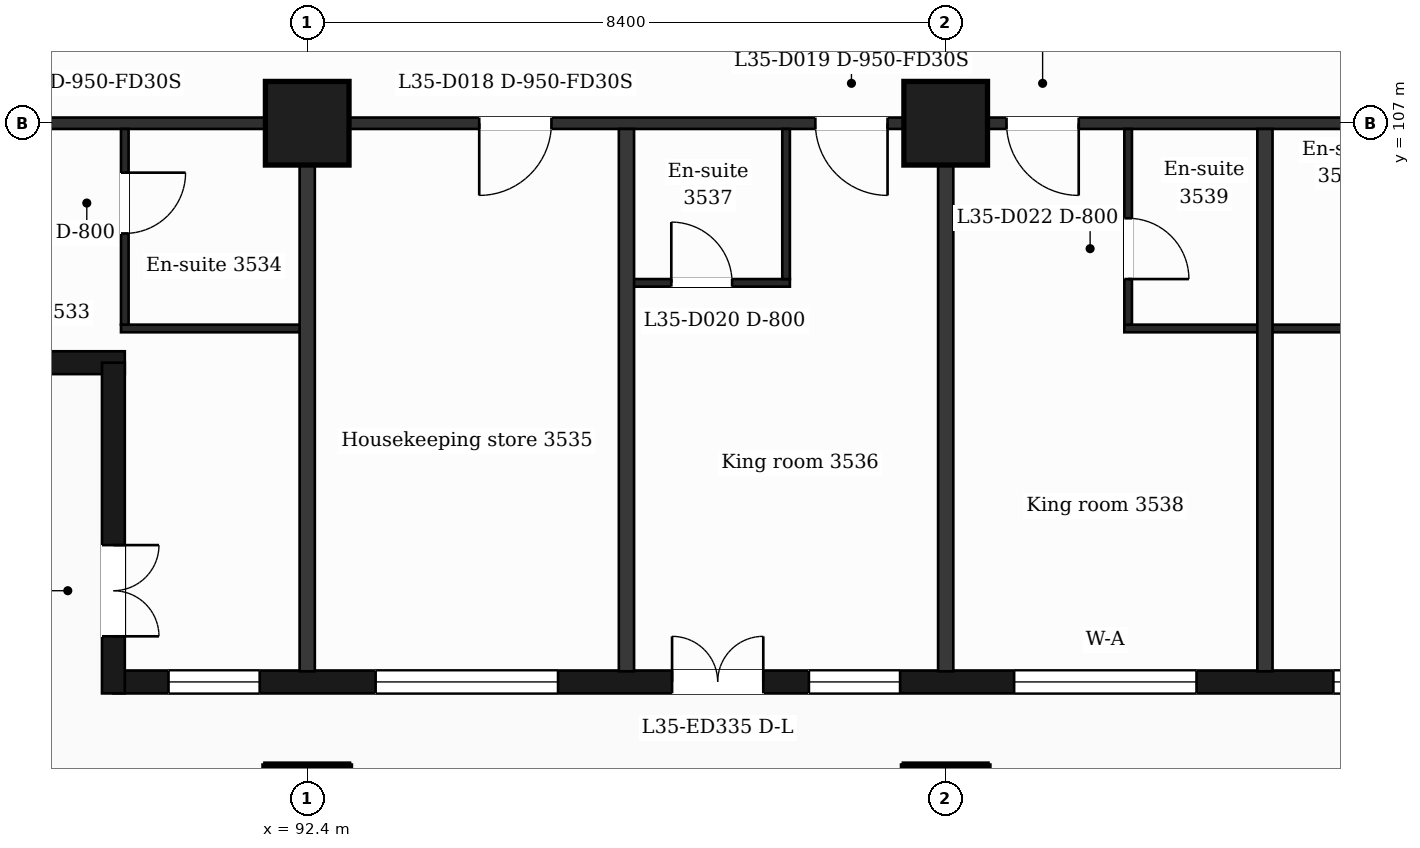
"""IFC4 building model, lengths in metres.
Left out: names, types, materials, properties, quantities, classifications, styles, units other than length and angle.
Written with IfcOpenShell. Run it as: python <this file> out.ifc"""

import sys

from ifc_helpers import new_model, si_unit, direction, frame, frame_2d, origin, origin_2d, place, context, subcontext, project, spatial, rectangle, extrude, element, fill, save


model = new_model("IFC4")
c1 = context("Model", 3, precision=1e-05, world=origin(), true_north=direction((0.0, 1.0)))
c2 = subcontext(c1, "Body", "Model", "MODEL_VIEW")
j1 = project(units=[si_unit("LENGTHUNIT", "METRE"), si_unit("PLANEANGLEUNIT", "RADIAN")], contexts=[c1])
p1 = place(None, origin())
s1 = spatial("IfcSite", under=j1, at=p1, CompositionType="ELEMENT")
p2 = place(p1, origin())
s2 = spatial("IfcBuilding", under=s1, at=p2, CompositionType="ELEMENT")
p3 = place(p2, frame((0.0, 0.0, 151.5)))
s3 = spatial("IfcBuildingStorey", under=s2, at=p3, CompositionType="ELEMENT", Elevation=151.5)
for number, where, z_axis, x_axis in (
    (1, (92.4, 98.0, 0.0), (0.0, 0.0, 1.0), (1.0, 0.0, 0.0)),
    (2, (100.8, 98.0, 0.0), (0.0, 0.0, 1.0), (1.0, 0.0, 0.0)),
    (3, (92.4, 107.0, 0.0), (0.0, 0.0, 1.0), (1.0, 0.0, 0.0)),
    (4, (100.8, 107.0, 0.0), (0.0, 0.0, 1.0), (1.0, 0.0, 0.0)),
):
    element("IfcColumn", number, at=place(p3, frame(where, z_axis=z_axis, x_axis=x_axis)), inside=s3, PredefinedType="COLUMN", context=c2, shape_type="SweptSolid", body=[
        extrude(rectangle(XDim=1.1, YDim=1.1, at=origin_2d()), origin(), (0.0, 0.0, 1.0), 3.7),
    ])
p4 = place(p3, frame((89.85, 99.65, 0.0), z_axis=(0.0, 0.0, 1.0), x_axis=(1.0, 0.0, 0.0)))
e5 = element("IfcWall", 5, at=p4, inside=s3, PredefinedType="SOLIDWALL", context=c2, shape_type="SweptSolid", body=[
    extrude(rectangle(XDim=47.25, YDim=0.3, at=frame_2d((23.625, 0.0))), origin(), (0.0, 0.0, 1.0), 3.38),
])
p5 = place(p4, frame((0.725, 0.0, 0.9)))
e6 = element("IfcOpeningElement", 6, at=p5, cuts=e5, PredefinedType="OPENING", context=c2, shape_type="SweptSolid", body=[
    extrude(rectangle(XDim=1.2, YDim=2.1, at=frame_2d((0.6, 1.05))), frame((0.0, 0.16, 0.0), z_axis=(0.0, -1.0, 0.0), x_axis=(1.0, 0.0, 0.0)), (0.0, 0.0, 1.0), 0.32),
])
p6 = place(p4, frame((3.45, 0.0, 0.9)))
e7 = element("IfcOpeningElement", 7, at=p6, cuts=e5, PredefinedType="OPENING", context=c2, shape_type="SweptSolid", body=[
    extrude(rectangle(XDim=2.4, YDim=2.1, at=frame_2d((1.2, 1.05))), frame((0.0, 0.16, 0.0), z_axis=(0.0, -1.0, 0.0), x_axis=(1.0, 0.0, 0.0)), (0.0, 0.0, 1.0), 0.32),
])
p7 = place(p4, frame((7.35, 0.0, 0.0)))
e8 = element("IfcOpeningElement", 8, at=p7, cuts=e5, PredefinedType="OPENING", context=c2, shape_type="SweptSolid", body=[
    extrude(rectangle(XDim=1.2, YDim=2.4, at=frame_2d((0.6, 1.2))), frame((0.0, 0.16, 0.0), z_axis=(0.0, -1.0, 0.0), x_axis=(1.0, 0.0, 0.0)), (0.0, 0.0, 1.0), 0.32),
])
p8 = place(p4, frame((9.15, 0.0, 0.9)))
e9 = element("IfcOpeningElement", 9, at=p8, cuts=e5, PredefinedType="OPENING", context=c2, shape_type="SweptSolid", body=[
    extrude(rectangle(XDim=1.2, YDim=2.1, at=frame_2d((0.6, 1.05))), frame((0.0, 0.16, 0.0), z_axis=(0.0, -1.0, 0.0), x_axis=(1.0, 0.0, 0.0)), (0.0, 0.0, 1.0), 0.32),
])
p9 = place(p4, frame((11.85, 0.0, 0.9)))
e10 = element("IfcOpeningElement", 10, at=p9, cuts=e5, PredefinedType="OPENING", context=c2, shape_type="SweptSolid", body=[
    extrude(rectangle(XDim=2.4, YDim=2.1, at=frame_2d((1.2, 1.05))), frame((0.0, 0.16, 0.0), z_axis=(0.0, -1.0, 0.0), x_axis=(1.0, 0.0, 0.0)), (0.0, 0.0, 1.0), 0.32),
])
p10 = place(p4, frame((16.05, 0.0, 0.9)))
e11 = element("IfcOpeningElement", 11, at=p10, cuts=e5, PredefinedType="OPENING", context=c2, shape_type="SweptSolid", body=[
    extrude(rectangle(XDim=2.4, YDim=2.1, at=frame_2d((1.2, 1.05))), frame((0.0, 0.16, 0.0), z_axis=(0.0, -1.0, 0.0), x_axis=(1.0, 0.0, 0.0)), (0.0, 0.0, 1.0), 0.32),
])
p11 = place(p4, frame((20.85, 0.0, 0.9)))
e12 = element("IfcOpeningElement", 12, at=p11, cuts=e5, PredefinedType="OPENING", context=c2, shape_type="SweptSolid", body=[
    extrude(rectangle(XDim=1.2, YDim=2.1, at=frame_2d((0.6, 1.05))), frame((0.0, 0.16, 0.0), z_axis=(0.0, -1.0, 0.0), x_axis=(1.0, 0.0, 0.0)), (0.0, 0.0, 1.0), 0.32),
])
p12 = place(p4, frame((25.05, 0.0, 0.9)))
e13 = element("IfcOpeningElement", 13, at=p12, cuts=e5, PredefinedType="OPENING", context=c2, shape_type="SweptSolid", body=[
    extrude(rectangle(XDim=1.2, YDim=2.1, at=frame_2d((0.6, 1.05))), frame((0.0, 0.16, 0.0), z_axis=(0.0, -1.0, 0.0), x_axis=(1.0, 0.0, 0.0)), (0.0, 0.0, 1.0), 0.32),
])
p13 = place(p4, frame((28.65, 0.0, 0.9)))
e14 = element("IfcOpeningElement", 14, at=p13, cuts=e5, PredefinedType="OPENING", context=c2, shape_type="SweptSolid", body=[
    extrude(rectangle(XDim=2.4, YDim=2.1, at=frame_2d((1.2, 1.05))), frame((0.0, 0.16, 0.0), z_axis=(0.0, -1.0, 0.0), x_axis=(1.0, 0.0, 0.0)), (0.0, 0.0, 1.0), 0.32),
])
p14 = place(p4, frame((32.85, 0.0, 0.9)))
e15 = element("IfcOpeningElement", 15, at=p14, cuts=e5, PredefinedType="OPENING", context=c2, shape_type="SweptSolid", body=[
    extrude(rectangle(XDim=2.4, YDim=2.1, at=frame_2d((1.2, 1.05))), frame((0.0, 0.16, 0.0), z_axis=(0.0, -1.0, 0.0), x_axis=(1.0, 0.0, 0.0)), (0.0, 0.0, 1.0), 0.32),
])
p15 = place(p4, frame((37.05, 0.0, 0.9)))
e16 = element("IfcOpeningElement", 16, at=p15, cuts=e5, PredefinedType="OPENING", context=c2, shape_type="SweptSolid", body=[
    extrude(rectangle(XDim=2.4, YDim=2.1, at=frame_2d((1.2, 1.05))), frame((0.0, 0.16, 0.0), z_axis=(0.0, -1.0, 0.0), x_axis=(1.0, 0.0, 0.0)), (0.0, 0.0, 1.0), 0.32),
])
p16 = place(p4, frame((41.25, 0.0, 0.9)))
e17 = element("IfcOpeningElement", 17, at=p16, cuts=e5, PredefinedType="OPENING", context=c2, shape_type="SweptSolid", body=[
    extrude(rectangle(XDim=2.4, YDim=2.1, at=frame_2d((1.2, 1.05))), frame((0.0, 0.16, 0.0), z_axis=(0.0, -1.0, 0.0), x_axis=(1.0, 0.0, 0.0)), (0.0, 0.0, 1.0), 0.32),
])
p17 = place(p4, frame((45.25, 0.0, 0.9)))
e18 = element("IfcOpeningElement", 18, at=p17, cuts=e5, PredefinedType="OPENING", context=c2, shape_type="SweptSolid", body=[
    extrude(rectangle(XDim=1.2, YDim=2.1, at=frame_2d((0.6, 1.05))), frame((0.0, 0.16, 0.0), z_axis=(0.0, -1.0, 0.0), x_axis=(1.0, 0.0, 0.0)), (0.0, 0.0, 1.0), 0.32),
])
p18 = place(p3, frame((86.452, 103.85, 0.0), z_axis=(0.0, 0.0, 1.0), x_axis=(1.0, 0.0, 0.0)))
e19 = element("IfcWall", 19, at=p18, inside=s3, PredefinedType="SOLIDWALL", context=c2, shape_type="SweptSolid", body=[
    extrude(rectangle(XDim=3.548, YDim=0.3, at=frame_2d((1.774, 0.0))), origin(), (0.0, 0.0, 1.0), 3.38),
])
p19 = place(p3, frame((89.85, 103.85, 0.0), z_axis=(0.0, 0.0, 1.0), x_axis=(0.0, -1.0, 0.0)))
e20 = element("IfcWall", 20, at=p19, inside=s3, PredefinedType="SOLIDWALL", context=c2, shape_type="SweptSolid", body=[
    extrude(rectangle(XDim=4.35, YDim=0.3, at=frame_2d((2.175, 0.0))), origin(), (0.0, 0.0, 1.0), 3.38),
])
p20 = place(p19, frame((2.4, 0.0, 0.0)))
e21 = element("IfcOpeningElement", 21, at=p20, cuts=e20, PredefinedType="OPENING", context=c2, shape_type="SweptSolid", body=[
    extrude(rectangle(XDim=1.2, YDim=2.4, at=frame_2d((0.6, 1.2))), frame((0.0, 0.16, 0.0), z_axis=(0.0, -1.0, 0.0), x_axis=(1.0, 0.0, 0.0)), (0.0, 0.0, 1.0), 0.32),
])
p21 = place(p3, frame((89.95, 104.3, 0.0), z_axis=(0.0, 0.0, 1.0), x_axis=(1.0, 0.0, 0.0)))
e22 = element("IfcWall", 22, at=p21, inside=s3, PredefinedType="PARTITIONING", context=c2, shape_type="SweptSolid", body=[
    extrude(rectangle(XDim=2.45, YDim=0.1, at=frame_2d((1.225, 0.0))), origin(), (0.0, 0.0, 1.0), 3.38),
])
p22 = place(p3, frame((103.15, 104.3, 0.0), z_axis=(0.0, 0.0, 1.0), x_axis=(1.0, 0.0, 0.0)))
e23 = element("IfcWall", 23, at=p22, inside=s3, PredefinedType="PARTITIONING", context=c2, shape_type="SweptSolid", body=[
    extrude(rectangle(XDim=3.7, YDim=0.1, at=frame_2d((1.85, 0.0))), origin(), (0.0, 0.0, 1.0), 3.38),
])
p23 = place(p3, frame((96.6, 104.9, 0.0), z_axis=(0.0, 0.0, 1.0), x_axis=(1.0, 0.0, 0.0)))
e24 = element("IfcWall", 24, at=p23, inside=s3, PredefinedType="PARTITIONING", context=c2, shape_type="SweptSolid", body=[
    extrude(rectangle(XDim=2.15, YDim=0.1, at=frame_2d((1.075, 0.0))), origin(), (0.0, 0.0, 1.0), 3.38),
])
p24 = place(p23, frame((0.59, 0.0, 0.0)))
e25 = element("IfcOpeningElement", 25, at=p24, cuts=e24, PredefinedType="OPENING", context=c2, shape_type="SweptSolid", body=[
    extrude(rectangle(XDim=0.8, YDim=2.1, at=frame_2d((0.4, 1.05))), frame((0.0, 0.06, 0.0), z_axis=(0.0, -1.0, 0.0), x_axis=(1.0, 0.0, 0.0)), (0.0, 0.0, 1.0), 0.12),
])
p25 = place(p3, frame((87.018, 107.0, 0.0), z_axis=(0.0, 0.0, 1.0), x_axis=(1.0, 0.0, 0.0)))
e26 = element("IfcWall", 26, at=p25, inside=s3, PredefinedType="PARTITIONING", context=c2, shape_type="SweptSolid", body=[
    extrude(rectangle(XDim=52.765, YDim=0.15, at=frame_2d((26.382, 0.0))), origin(), (0.0, 0.0, 1.0), 3.38),
])
p26 = place(p25, frame((0.707, 0.0, 0.0)))
e27 = element("IfcOpeningElement", 27, at=p26, cuts=e26, PredefinedType="OPENING", context=c2, shape_type="SweptSolid", body=[
    extrude(rectangle(XDim=0.95, YDim=2.1, at=frame_2d((0.475, 1.05))), frame((0.0, 0.085, 0.0), z_axis=(0.0, -1.0, 0.0), x_axis=(1.0, 0.0, 0.0)), (0.0, 0.0, 1.0), 0.17),
])
p27 = place(p25, frame((7.645, 0.0, 0.0)))
e28 = element("IfcOpeningElement", 28, at=p27, cuts=e26, PredefinedType="OPENING", context=c2, shape_type="SweptSolid", body=[
    extrude(rectangle(XDim=0.95, YDim=2.1, at=frame_2d((0.475, 1.05))), frame((0.0, 0.085, 0.0), z_axis=(0.0, -1.0, 0.0), x_axis=(1.0, 0.0, 0.0)), (0.0, 0.0, 1.0), 0.17),
])
p28 = place(p25, frame((12.067, 0.0, 0.0)))
e29 = element("IfcOpeningElement", 29, at=p28, cuts=e26, PredefinedType="OPENING", context=c2, shape_type="SweptSolid", body=[
    extrude(rectangle(XDim=0.95, YDim=2.1, at=frame_2d((0.475, 1.05))), frame((0.0, 0.085, 0.0), z_axis=(0.0, -1.0, 0.0), x_axis=(1.0, 0.0, 0.0)), (0.0, 0.0, 1.0), 0.17),
])
p29 = place(p25, frame((14.582, 0.0, 0.0)))
e30 = element("IfcOpeningElement", 30, at=p29, cuts=e26, PredefinedType="OPENING", context=c2, shape_type="SweptSolid", body=[
    extrude(rectangle(XDim=0.95, YDim=2.1, at=frame_2d((0.475, 1.05))), frame((0.0, 0.085, 0.0), z_axis=(0.0, -1.0, 0.0), x_axis=(1.0, 0.0, 0.0)), (0.0, 0.0, 1.0), 0.17),
])
p30 = place(p25, frame((20.432, 0.0, 0.0)))
e31 = element("IfcOpeningElement", 31, at=p30, cuts=e26, PredefinedType="OPENING", context=c2, shape_type="SweptSolid", body=[
    extrude(rectangle(XDim=0.95, YDim=2.1, at=frame_2d((0.475, 1.05))), frame((0.0, 0.085, 0.0), z_axis=(0.0, -1.0, 0.0), x_axis=(1.0, 0.0, 0.0)), (0.0, 0.0, 1.0), 0.17),
])
p31 = place(p25, frame((23.532, 0.0, 0.0)))
e32 = element("IfcOpeningElement", 32, at=p31, cuts=e26, PredefinedType="OPENING", context=c2, shape_type="SweptSolid", body=[
    extrude(rectangle(XDim=1.0, YDim=2.1, at=frame_2d((0.5, 1.05))), frame((0.0, 0.085, 0.0), z_axis=(0.0, -1.0, 0.0), x_axis=(1.0, 0.0, 0.0)), (0.0, 0.0, 1.0), 0.17),
])
p32 = place(p25, frame((36.807, 0.0, 0.0)))
e33 = element("IfcOpeningElement", 33, at=p32, cuts=e26, PredefinedType="OPENING", context=c2, shape_type="SweptSolid", body=[
    extrude(rectangle(XDim=1.0, YDim=2.1, at=frame_2d((0.5, 1.05))), frame((0.0, 0.085, 0.0), z_axis=(0.0, -1.0, 0.0), x_axis=(1.0, 0.0, 0.0)), (0.0, 0.0, 1.0), 0.17),
])
p33 = place(p25, frame((43.457, 0.0, 0.0)))
e34 = element("IfcOpeningElement", 34, at=p33, cuts=e26, PredefinedType="OPENING", context=c2, shape_type="SweptSolid", body=[
    extrude(rectangle(XDim=0.95, YDim=2.1, at=frame_2d((0.475, 1.05))), frame((0.0, 0.085, 0.0), z_axis=(0.0, -1.0, 0.0), x_axis=(1.0, 0.0, 0.0)), (0.0, 0.0, 1.0), 0.17),
])
p34 = place(p25, frame((48.974, 0.0, 0.0)))
e35 = element("IfcOpeningElement", 35, at=p34, cuts=e26, PredefinedType="OPENING", context=c2, shape_type="SweptSolid", body=[
    extrude(rectangle(XDim=0.95, YDim=2.1, at=frame_2d((0.475, 1.05))), frame((0.0, 0.085, 0.0), z_axis=(0.0, -1.0, 0.0), x_axis=(1.0, 0.0, 0.0)), (0.0, 0.0, 1.0), 0.17),
])
p35 = place(p3, frame((90.0, 104.35, 0.0), z_axis=(0.0, 0.0, 1.0), x_axis=(0.0, 1.0, 0.0)))
e36 = element("IfcWall", 36, at=p35, inside=s3, PredefinedType="PARTITIONING", context=c2, shape_type="SweptSolid", body=[
    extrude(rectangle(XDim=2.575, YDim=0.1, at=frame_2d((1.288, 0.0))), origin(), (0.0, 0.0, 1.0), 3.38),
])
p36 = place(p35, frame((1.2, 0.0, 0.0)))
e37 = element("IfcOpeningElement", 37, at=p36, cuts=e36, PredefinedType="OPENING", context=c2, shape_type="SweptSolid", body=[
    extrude(rectangle(XDim=0.8, YDim=2.1, at=frame_2d((0.4, 1.05))), frame((0.0, 0.06, 0.0), z_axis=(0.0, -1.0, 0.0), x_axis=(1.0, 0.0, 0.0)), (0.0, 0.0, 1.0), 0.12),
])
for number, where, z_axis, x_axis in (
    (38, (92.4, 99.79, 0.0), (0.0, 0.0, 1.0), (0.0, 1.0, 0.0)),
    (39, (96.6, 99.79, 0.0), (0.0, 0.0, 1.0), (0.0, 1.0, 0.0)),
):
    element("IfcWall", number, at=place(p3, frame(where, z_axis=z_axis, x_axis=x_axis)), inside=s3, PredefinedType="PARTITIONING", context=c2, shape_type="SweptSolid", body=[
        extrude(rectangle(XDim=7.135, YDim=0.2, at=frame_2d((3.567, 0.0))), origin(), (0.0, 0.0, 1.0), 3.38),
    ])
p37 = place(p3, frame((98.7, 104.95, 0.0), z_axis=(0.0, 0.0, 1.0), x_axis=(0.0, 1.0, 0.0)))
e40 = element("IfcWall", 40, at=p37, inside=s3, PredefinedType="PARTITIONING", context=c2, shape_type="SweptSolid", body=[
    extrude(rectangle(XDim=1.975, YDim=0.1, at=frame_2d((0.988, 0.0))), origin(), (0.0, 0.0, 1.0), 3.38),
])
p38 = place(p3, frame((100.8, 99.79, 0.0), z_axis=(0.0, 0.0, 1.0), x_axis=(0.0, 1.0, 0.0)))
e41 = element("IfcWall", 41, at=p38, inside=s3, PredefinedType="PARTITIONING", context=c2, shape_type="SweptSolid", body=[
    extrude(rectangle(XDim=7.135, YDim=0.2, at=frame_2d((3.567, 0.0))), origin(), (0.0, 0.0, 1.0), 3.38),
])
p39 = place(p3, frame((103.2, 104.35, 0.0), z_axis=(0.0, 0.0, 1.0), x_axis=(0.0, 1.0, 0.0)))
e42 = element("IfcWall", 42, at=p39, inside=s3, PredefinedType="PARTITIONING", context=c2, shape_type="SweptSolid", body=[
    extrude(rectangle(XDim=2.575, YDim=0.1, at=frame_2d((1.288, 0.0))), origin(), (0.0, 0.0, 1.0), 3.38),
])
p40 = place(p39, frame((0.6, 0.0, 0.0)))
e43 = element("IfcOpeningElement", 43, at=p40, cuts=e42, PredefinedType="OPENING", context=c2, shape_type="SweptSolid", body=[
    extrude(rectangle(XDim=0.8, YDim=2.1, at=frame_2d((0.4, 1.05))), frame((0.0, 0.06, 0.0), z_axis=(0.0, -1.0, 0.0), x_axis=(1.0, 0.0, 0.0)), (0.0, 0.0, 1.0), 0.12),
])
p41 = place(p3, frame((105.0, 99.79, 0.0), z_axis=(0.0, 0.0, 1.0), x_axis=(0.0, 1.0, 0.0)))
e44 = element("IfcWall", 44, at=p41, inside=s3, PredefinedType="PARTITIONING", context=c2, shape_type="SweptSolid", body=[
    extrude(rectangle(XDim=7.135, YDim=0.2, at=frame_2d((3.567, 0.0))), origin(), (0.0, 0.0, 1.0), 3.38),
])
p42 = place(p5, origin())
e45 = element("IfcWindow", 45, at=p42, inside=s3, PartitioningType="SINGLE_PANEL", PredefinedType="WINDOW", context=c2, shape_type="SweptSolid", body=[
    extrude(rectangle(XDim=1.2, YDim=2.1, at=frame_2d((0.6, 1.05))), frame((0.0, 0.03, 0.0), z_axis=(0.0, -1.0, 0.0), x_axis=(1.0, 0.0, 0.0)), (0.0, 0.0, 1.0), 0.06),
])
fill(e6, e45)
p43 = place(p6, origin())
e46 = element("IfcWindow", 46, at=p43, inside=s3, PartitioningType="SINGLE_PANEL", PredefinedType="WINDOW", context=c2, shape_type="SweptSolid", body=[
    extrude(rectangle(XDim=2.4, YDim=2.1, at=frame_2d((1.2, 1.05))), frame((0.0, 0.03, 0.0), z_axis=(0.0, -1.0, 0.0), x_axis=(1.0, 0.0, 0.0)), (0.0, 0.0, 1.0), 0.06),
])
fill(e7, e46)
p44 = place(p7, origin())
e47 = element("IfcDoor", 47, at=p44, inside=s3, OperationType="DOUBLE_DOOR_SINGLE_SWING", PredefinedType="DOOR", context=c2, shape_type="SweptSolid", body=[
    extrude(rectangle(XDim=1.2, YDim=2.4, at=frame_2d((0.6, 1.2))), frame((0.0, 0.025, 0.0), z_axis=(0.0, -1.0, 0.0), x_axis=(1.0, 0.0, 0.0)), (0.0, 0.0, 1.0), 0.05),
])
fill(e8, e47)
p45 = place(p8, origin())
e48 = element("IfcWindow", 48, at=p45, inside=s3, PartitioningType="SINGLE_PANEL", PredefinedType="WINDOW", context=c2, shape_type="SweptSolid", body=[
    extrude(rectangle(XDim=1.2, YDim=2.1, at=frame_2d((0.6, 1.05))), frame((0.0, 0.03, 0.0), z_axis=(0.0, -1.0, 0.0), x_axis=(1.0, 0.0, 0.0)), (0.0, 0.0, 1.0), 0.06),
])
fill(e9, e48)
p46 = place(p9, origin())
e49 = element("IfcWindow", 49, at=p46, inside=s3, PartitioningType="SINGLE_PANEL", PredefinedType="WINDOW", context=c2, shape_type="SweptSolid", body=[
    extrude(rectangle(XDim=2.4, YDim=2.1, at=frame_2d((1.2, 1.05))), frame((0.0, 0.03, 0.0), z_axis=(0.0, -1.0, 0.0), x_axis=(1.0, 0.0, 0.0)), (0.0, 0.0, 1.0), 0.06),
])
fill(e10, e49)
p47 = place(p10, origin())
e50 = element("IfcWindow", 50, at=p47, inside=s3, PartitioningType="SINGLE_PANEL", PredefinedType="WINDOW", context=c2, shape_type="SweptSolid", body=[
    extrude(rectangle(XDim=2.4, YDim=2.1, at=frame_2d((1.2, 1.05))), frame((0.0, 0.03, 0.0), z_axis=(0.0, -1.0, 0.0), x_axis=(1.0, 0.0, 0.0)), (0.0, 0.0, 1.0), 0.06),
])
fill(e11, e50)
p48 = place(p20, origin())
e51 = element("IfcDoor", 51, at=p48, inside=s3, OperationType="DOUBLE_DOOR_SINGLE_SWING", PredefinedType="DOOR", context=c2, shape_type="SweptSolid", body=[
    extrude(rectangle(XDim=1.2, YDim=2.4, at=frame_2d((0.6, 1.2))), frame((0.0, 0.025, 0.0), z_axis=(0.0, -1.0, 0.0), x_axis=(1.0, 0.0, 0.0)), (0.0, 0.0, 1.0), 0.05),
])
fill(e21, e51)
p49 = place(p36, origin())
e52 = element("IfcDoor", 52, at=p49, inside=s3, OperationType="SINGLE_SWING_RIGHT", PredefinedType="DOOR", context=c2, shape_type="SweptSolid", body=[
    extrude(rectangle(XDim=0.8, YDim=2.1, at=frame_2d((0.4, 1.05))), frame((0.0, 0.025, 0.0), z_axis=(0.0, -1.0, 0.0), x_axis=(1.0, 0.0, 0.0)), (0.0, 0.0, 1.0), 0.05),
])
fill(e37, e52)
p50 = place(p27, origin())
e53 = element("IfcDoor", 53, at=p50, inside=s3, OperationType="SINGLE_SWING_LEFT", PredefinedType="DOOR", context=c2, shape_type="SweptSolid", body=[
    extrude(rectangle(XDim=0.95, YDim=2.1, at=frame_2d((0.475, 1.05))), frame((0.0, 0.025, 0.0), z_axis=(0.0, -1.0, 0.0), x_axis=(1.0, 0.0, 0.0)), (0.0, 0.0, 1.0), 0.05),
])
fill(e28, e53)
p51 = place(p28, origin())
e54 = element("IfcDoor", 54, at=p51, inside=s3, OperationType="SINGLE_SWING_RIGHT", PredefinedType="DOOR", context=c2, shape_type="SweptSolid", body=[
    extrude(rectangle(XDim=0.95, YDim=2.1, at=frame_2d((0.475, 1.05))), frame((0.0, 0.025, 0.0), z_axis=(0.0, -1.0, 0.0), x_axis=(1.0, 0.0, 0.0)), (0.0, 0.0, 1.0), 0.05),
])
fill(e29, e54)
p52 = place(p24, origin())
e55 = element("IfcDoor", 55, at=p52, inside=s3, OperationType="SINGLE_SWING_LEFT", PredefinedType="DOOR", context=c2, shape_type="SweptSolid", body=[
    extrude(rectangle(XDim=0.8, YDim=2.1, at=frame_2d((0.4, 1.05))), frame((0.0, 0.025, 0.0), z_axis=(0.0, -1.0, 0.0), x_axis=(1.0, 0.0, 0.0)), (0.0, 0.0, 1.0), 0.05),
])
fill(e25, e55)
p53 = place(p29, origin())
e56 = element("IfcDoor", 56, at=p53, inside=s3, OperationType="SINGLE_SWING_RIGHT", PredefinedType="DOOR", context=c2, shape_type="SweptSolid", body=[
    extrude(rectangle(XDim=0.95, YDim=2.1, at=frame_2d((0.475, 1.05))), frame((0.0, 0.025, 0.0), z_axis=(0.0, -1.0, 0.0), x_axis=(1.0, 0.0, 0.0)), (0.0, 0.0, 1.0), 0.05),
])
fill(e30, e56)
p54 = place(p40, origin())
e57 = element("IfcDoor", 57, at=p54, inside=s3, OperationType="SINGLE_SWING_LEFT", PredefinedType="DOOR", context=c2, shape_type="SweptSolid", body=[
    extrude(rectangle(XDim=0.8, YDim=2.1, at=frame_2d((0.4, 1.05))), frame((0.0, 0.025, 0.0), z_axis=(0.0, -1.0, 0.0), x_axis=(1.0, 0.0, 0.0)), (0.0, 0.0, 1.0), 0.05),
])
fill(e43, e57)
save(model, sys.argv[1])
